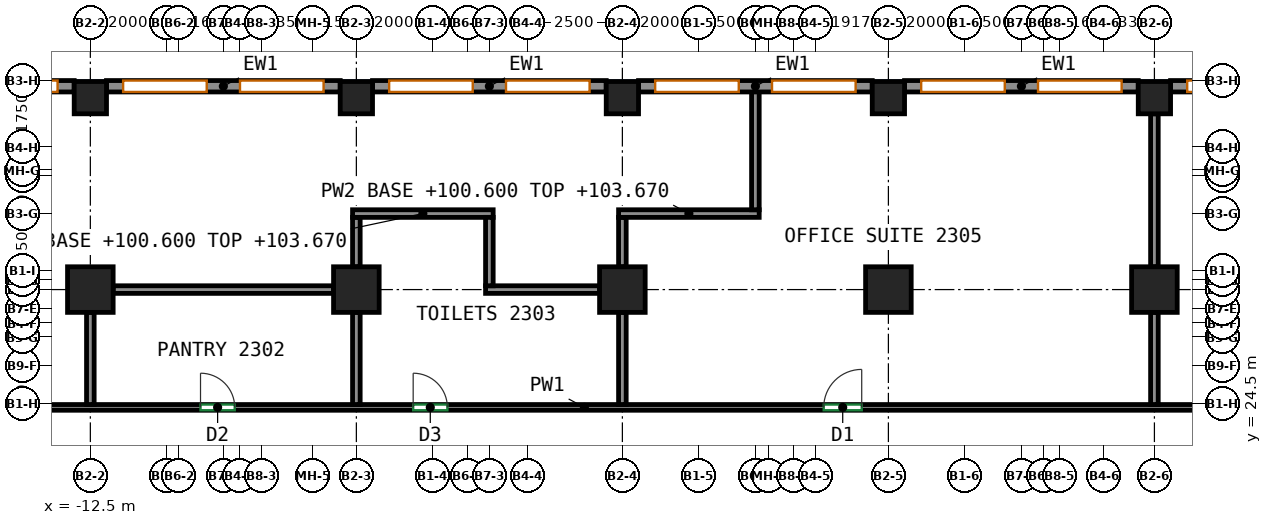
"""IFC4 building model, lengths in metres.
Left out: names, types, materials, properties, quantities, classifications, styles, units other than length and angle.
Written with IfcOpenShell. Run it as: python <this file> out.ifc"""

import sys

from ifc_helpers import new_model, si_unit, direction, frame, frame_2d, origin, origin_2d, place, context, subcontext, project, spatial, rectangle, extrude, source, transform, mapped, element, fill, save


model = new_model("IFC4")
c1 = context("Model", 3, precision=1e-05, world=origin(), true_north=direction((0.0, 1.0)))
c2 = subcontext(c1, "Body", "Model", "MODEL_VIEW")
j1 = project(units=[si_unit("LENGTHUNIT", "METRE"), si_unit("PLANEANGLEUNIT", "RADIAN")], contexts=[c1])
p1 = place(None, origin())
s1 = spatial("IfcSite", under=j1, at=p1, CompositionType="ELEMENT")
p2 = place(p1, origin())
s2 = spatial("IfcBuilding", under=s1, at=p2, CompositionType="ELEMENT")
p3 = place(p2, frame((0.0, 0.0, 100.6)))
s3 = spatial("IfcBuildingStorey", under=s2, at=p3, CompositionType="ELEMENT", Elevation=100.6)
m1 = source(origin(), c2, "Body", "SweptSolid", [
    extrude(rectangle(XDim=1.2, YDim=1.2, at=origin_2d()), origin(), (0.0, 0.0, 1.0), 3.72),
])
p4 = place(p3, frame((-12.5, 27.5, 0.0), z_axis=(0.0, 0.0, 1.0), x_axis=(1.0, 0.0, 0.0)))
e1 = element("IfcColumn", 1, at=p4, inside=s3, PredefinedType="COLUMN", context=c2, shape_type="MappedRepresentation", body=[
    mapped(m1, transform((0.0, 0.0, 0.0))),
])
m2 = source(origin(), c2, "Body", "SweptSolid", [
    extrude(rectangle(XDim=0.85, YDim=0.85, at=origin_2d()), origin(), (0.0, 0.0, 1.0), 3.72),
])
p5 = place(p3, frame((-12.5, 32.55, 0.0), z_axis=(0.0, 0.0, 1.0), x_axis=(1.0, 0.0, 0.0)))
e2 = element("IfcColumn", 2, at=p5, inside=s3, PredefinedType="COLUMN", context=c2, shape_type="MappedRepresentation", body=[
    mapped(m2, transform((0.0, 0.0, 0.0))),
])
p6 = place(p3, frame((-5.5, 27.5, 0.0), z_axis=(0.0, 0.0, 1.0), x_axis=(1.0, 0.0, 0.0)))
e3 = element("IfcColumn", 3, at=p6, inside=s3, PredefinedType="COLUMN", context=c2, shape_type="MappedRepresentation", body=[
    mapped(m1, transform((0.0, 0.0, 0.0))),
])
p7 = place(p3, frame((-5.5, 32.55, 0.0), z_axis=(0.0, 0.0, 1.0), x_axis=(1.0, 0.0, 0.0)))
e4 = element("IfcColumn", 4, at=p7, inside=s3, PredefinedType="COLUMN", context=c2, shape_type="MappedRepresentation", body=[
    mapped(m2, transform((0.0, 0.0, 0.0))),
])
p8 = place(p3, frame((1.5, 27.5, 0.0), z_axis=(0.0, 0.0, 1.0), x_axis=(1.0, 0.0, 0.0)))
e5 = element("IfcColumn", 5, at=p8, inside=s3, PredefinedType="COLUMN", context=c2, shape_type="MappedRepresentation", body=[
    mapped(m1, transform((0.0, 0.0, 0.0))),
])
p9 = place(p3, frame((1.5, 32.55, 0.0), z_axis=(0.0, 0.0, 1.0), x_axis=(1.0, 0.0, 0.0)))
e6 = element("IfcColumn", 6, at=p9, inside=s3, PredefinedType="COLUMN", context=c2, shape_type="MappedRepresentation", body=[
    mapped(m2, transform((0.0, 0.0, 0.0))),
])
p10 = place(p3, frame((8.5, 27.5, 0.0), z_axis=(0.0, 0.0, 1.0), x_axis=(1.0, 0.0, 0.0)))
e7 = element("IfcColumn", 7, at=p10, inside=s3, PredefinedType="COLUMN", context=c2, shape_type="MappedRepresentation", body=[
    mapped(m1, transform((0.0, 0.0, 0.0))),
])
p11 = place(p3, frame((8.5, 32.55, 0.0), z_axis=(0.0, 0.0, 1.0), x_axis=(1.0, 0.0, 0.0)))
e8 = element("IfcColumn", 8, at=p11, inside=s3, PredefinedType="COLUMN", context=c2, shape_type="MappedRepresentation", body=[
    mapped(m2, transform((0.0, 0.0, 0.0))),
])
p12 = place(p3, frame((15.5, 27.5, 0.0), z_axis=(0.0, 0.0, 1.0), x_axis=(1.0, 0.0, 0.0)))
e9 = element("IfcColumn", 9, at=p12, inside=s3, PredefinedType="COLUMN", context=c2, shape_type="MappedRepresentation", body=[
    mapped(m1, transform((0.0, 0.0, 0.0))),
])
p13 = place(p3, frame((15.5, 32.55, 0.0), z_axis=(0.0, 0.0, 1.0), x_axis=(1.0, 0.0, 0.0)))
e10 = element("IfcColumn", 10, at=p13, inside=s3, PredefinedType="COLUMN", context=c2, shape_type="MappedRepresentation", body=[
    mapped(m2, transform((0.0, 0.0, 0.0))),
])
m3 = source(origin(), c2, "Body", "SweptSolid", [
    extrude(rectangle(XDim=6.15, YDim=0.3, at=frame_2d((3.075, 0.0))), origin(), (0.0, 0.0, 1.0), 3.72),
])
p14 = place(p3, frame((22.075, 32.85, 0.0), z_axis=(0.0, 0.0, 1.0), x_axis=(-1.0, 0.0, 0.0)))
e11 = element("IfcWall", 11, at=p14, inside=s3, PredefinedType="SOLIDWALL", context=c2, shape_type="MappedRepresentation", body=[
    mapped(m3, transform((0.0, 0.0, 0.0))),
])
p15 = place(p14, frame((0.438, 0.0, 0.7)))
e12 = element("IfcOpeningElement", 12, at=p15, cuts=e11, PredefinedType="OPENING", context=c2, shape_type="SweptSolid", body=[
    extrude(rectangle(XDim=2.2, YDim=2.25, at=frame_2d((1.1, 1.125))), frame((0.0, 0.16, 0.0), z_axis=(0.0, -1.0, 0.0), x_axis=(1.0, 0.0, 0.0)), (0.0, 0.0, 1.0), 0.32),
])
p16 = place(p14, frame((3.512, 0.0, 0.7)))
e13 = element("IfcOpeningElement", 13, at=p16, cuts=e11, PredefinedType="OPENING", context=c2, shape_type="SweptSolid", body=[
    extrude(rectangle(XDim=2.2, YDim=2.25, at=frame_2d((1.1, 1.125))), frame((0.0, 0.16, 0.0), z_axis=(0.0, -1.0, 0.0), x_axis=(1.0, 0.0, 0.0)), (0.0, 0.0, 1.0), 0.32),
])
p17 = place(p3, frame((15.075, 32.85, 0.0), z_axis=(0.0, 0.0, 1.0), x_axis=(-1.0, 0.0, 0.0)))
e14 = element("IfcWall", 14, at=p17, inside=s3, PredefinedType="SOLIDWALL", context=c2, shape_type="MappedRepresentation", body=[
    mapped(m3, transform((0.0, 0.0, 0.0))),
])
p18 = place(p17, frame((0.438, 0.0, 0.7)))
e15 = element("IfcOpeningElement", 15, at=p18, cuts=e14, PredefinedType="OPENING", context=c2, shape_type="SweptSolid", body=[
    extrude(rectangle(XDim=2.2, YDim=2.25, at=frame_2d((1.1, 1.125))), frame((0.0, 0.16, 0.0), z_axis=(0.0, -1.0, 0.0), x_axis=(1.0, 0.0, 0.0)), (0.0, 0.0, 1.0), 0.32),
])
p19 = place(p17, frame((3.512, 0.0, 0.7)))
e16 = element("IfcOpeningElement", 16, at=p19, cuts=e14, PredefinedType="OPENING", context=c2, shape_type="SweptSolid", body=[
    extrude(rectangle(XDim=2.2, YDim=2.25, at=frame_2d((1.1, 1.125))), frame((0.0, 0.16, 0.0), z_axis=(0.0, -1.0, 0.0), x_axis=(1.0, 0.0, 0.0)), (0.0, 0.0, 1.0), 0.32),
])
p20 = place(p3, frame((8.075, 32.85, 0.0), z_axis=(0.0, 0.0, 1.0), x_axis=(-1.0, 0.0, 0.0)))
e17 = element("IfcWall", 17, at=p20, inside=s3, PredefinedType="SOLIDWALL", context=c2, shape_type="MappedRepresentation", body=[
    mapped(m3, transform((0.0, 0.0, 0.0))),
])
p21 = place(p20, frame((0.438, 0.0, 0.7)))
e18 = element("IfcOpeningElement", 18, at=p21, cuts=e17, PredefinedType="OPENING", context=c2, shape_type="SweptSolid", body=[
    extrude(rectangle(XDim=2.2, YDim=2.25, at=frame_2d((1.1, 1.125))), frame((0.0, 0.16, 0.0), z_axis=(0.0, -1.0, 0.0), x_axis=(1.0, 0.0, 0.0)), (0.0, 0.0, 1.0), 0.32),
])
p22 = place(p20, frame((3.512, 0.0, 0.7)))
e19 = element("IfcOpeningElement", 19, at=p22, cuts=e17, PredefinedType="OPENING", context=c2, shape_type="SweptSolid", body=[
    extrude(rectangle(XDim=2.2, YDim=2.25, at=frame_2d((1.1, 1.125))), frame((0.0, 0.16, 0.0), z_axis=(0.0, -1.0, 0.0), x_axis=(1.0, 0.0, 0.0)), (0.0, 0.0, 1.0), 0.32),
])
p23 = place(p3, frame((1.075, 32.85, 0.0), z_axis=(0.0, 0.0, 1.0), x_axis=(-1.0, 0.0, 0.0)))
e20 = element("IfcWall", 20, at=p23, inside=s3, PredefinedType="SOLIDWALL", context=c2, shape_type="MappedRepresentation", body=[
    mapped(m3, transform((0.0, 0.0, 0.0))),
])
p24 = place(p23, frame((0.438, 0.0, 0.7)))
e21 = element("IfcOpeningElement", 21, at=p24, cuts=e20, PredefinedType="OPENING", context=c2, shape_type="SweptSolid", body=[
    extrude(rectangle(XDim=2.2, YDim=2.25, at=frame_2d((1.1, 1.125))), frame((0.0, 0.16, 0.0), z_axis=(0.0, -1.0, 0.0), x_axis=(1.0, 0.0, 0.0)), (0.0, 0.0, 1.0), 0.32),
])
p25 = place(p23, frame((3.512, 0.0, 0.7)))
e22 = element("IfcOpeningElement", 22, at=p25, cuts=e20, PredefinedType="OPENING", context=c2, shape_type="SweptSolid", body=[
    extrude(rectangle(XDim=2.2, YDim=2.25, at=frame_2d((1.1, 1.125))), frame((0.0, 0.16, 0.0), z_axis=(0.0, -1.0, 0.0), x_axis=(1.0, 0.0, 0.0)), (0.0, 0.0, 1.0), 0.32),
])
p26 = place(p3, frame((-5.925, 32.85, 0.0), z_axis=(0.0, 0.0, 1.0), x_axis=(-1.0, 0.0, 0.0)))
e23 = element("IfcWall", 23, at=p26, inside=s3, PredefinedType="SOLIDWALL", context=c2, shape_type="MappedRepresentation", body=[
    mapped(m3, transform((0.0, 0.0, 0.0))),
])
p27 = place(p26, frame((0.438, 0.0, 0.7)))
e24 = element("IfcOpeningElement", 24, at=p27, cuts=e23, PredefinedType="OPENING", context=c2, shape_type="SweptSolid", body=[
    extrude(rectangle(XDim=2.2, YDim=2.25, at=frame_2d((1.1, 1.125))), frame((0.0, 0.16, 0.0), z_axis=(0.0, -1.0, 0.0), x_axis=(1.0, 0.0, 0.0)), (0.0, 0.0, 1.0), 0.32),
])
p28 = place(p26, frame((3.512, 0.0, 0.7)))
e25 = element("IfcOpeningElement", 25, at=p28, cuts=e23, PredefinedType="OPENING", context=c2, shape_type="SweptSolid", body=[
    extrude(rectangle(XDim=2.2, YDim=2.25, at=frame_2d((1.1, 1.125))), frame((0.0, 0.16, 0.0), z_axis=(0.0, -1.0, 0.0), x_axis=(1.0, 0.0, 0.0)), (0.0, 0.0, 1.0), 0.32),
])
p29 = place(p3, frame((-12.925, 32.85, 0.0), z_axis=(0.0, 0.0, 1.0), x_axis=(-1.0, 0.0, 0.0)))
e26 = element("IfcWall", 26, at=p29, inside=s3, PredefinedType="SOLIDWALL", context=c2, shape_type="MappedRepresentation", body=[
    mapped(m3, transform((0.0, 0.0, 0.0))),
])
p30 = place(p29, frame((0.438, 0.0, 0.7)))
e27 = element("IfcOpeningElement", 27, at=p30, cuts=e26, PredefinedType="OPENING", context=c2, shape_type="SweptSolid", body=[
    extrude(rectangle(XDim=2.2, YDim=2.25, at=frame_2d((1.1, 1.125))), frame((0.0, 0.16, 0.0), z_axis=(0.0, -1.0, 0.0), x_axis=(1.0, 0.0, 0.0)), (0.0, 0.0, 1.0), 0.32),
])
p31 = place(p29, frame((3.512, 0.0, 0.7)))
e28 = element("IfcOpeningElement", 28, at=p31, cuts=e26, PredefinedType="OPENING", context=c2, shape_type="SweptSolid", body=[
    extrude(rectangle(XDim=2.2, YDim=2.25, at=frame_2d((1.1, 1.125))), frame((0.0, 0.16, 0.0), z_axis=(0.0, -1.0, 0.0), x_axis=(1.0, 0.0, 0.0)), (0.0, 0.0, 1.0), 0.32),
])
p32 = place(p3, frame((-19.575, 24.4, 0.0), z_axis=(0.0, 0.0, 1.0), x_axis=(1.0, 0.0, 0.0)))
e29 = element("IfcWall", 29, at=p32, inside=s3, PredefinedType="PARTITIONING", context=c2, shape_type="SweptSolid", body=[
    extrude(rectangle(XDim=40.15, YDim=0.15, at=frame_2d((20.075, 0.0))), origin(), (0.0, 0.0, 1.0), 3.72),
])
p33 = place(p32, frame((9.974, 0.0, 0.0)))
e30 = element("IfcOpeningElement", 30, at=p33, cuts=e29, PredefinedType="OPENING", context=c2, shape_type="SweptSolid", body=[
    extrude(rectangle(XDim=0.9, YDim=2.1, at=frame_2d((0.45, 1.05))), frame((0.0, 0.085, 0.0), z_axis=(0.0, -1.0, 0.0), x_axis=(1.0, 0.0, 0.0)), (0.0, 0.0, 1.0), 0.17),
])
p34 = place(p32, frame((15.57, 0.0, 0.0)))
e31 = element("IfcOpeningElement", 31, at=p34, cuts=e29, PredefinedType="OPENING", context=c2, shape_type="SweptSolid", body=[
    extrude(rectangle(XDim=0.9, YDim=2.1, at=frame_2d((0.45, 1.05))), frame((0.0, 0.085, 0.0), z_axis=(0.0, -1.0, 0.0), x_axis=(1.0, 0.0, 0.0)), (0.0, 0.0, 1.0), 0.17),
])
p35 = place(p32, frame((26.373, 0.0, 0.0)))
e32 = element("IfcOpeningElement", 32, at=p35, cuts=e29, PredefinedType="OPENING", context=c2, shape_type="SweptSolid", body=[
    extrude(rectangle(XDim=1.0, YDim=2.1, at=frame_2d((0.5, 1.05))), frame((0.0, 0.085, 0.0), z_axis=(0.0, -1.0, 0.0), x_axis=(1.0, 0.0, 0.0)), (0.0, 0.0, 1.0), 0.17),
])
p36 = place(p32, frame((37.619, 0.0, 0.0)))
e33 = element("IfcOpeningElement", 33, at=p36, cuts=e29, PredefinedType="OPENING", context=c2, shape_type="SweptSolid", body=[
    extrude(rectangle(XDim=1.0, YDim=2.1, at=frame_2d((0.5, 1.05))), frame((0.0, 0.085, 0.0), z_axis=(0.0, -1.0, 0.0), x_axis=(1.0, 0.0, 0.0)), (0.0, 0.0, 1.0), 0.17),
])
p37 = place(p3, frame((15.5, 28.1, 0.0), z_axis=(0.0, 0.0, 1.0), x_axis=(0.0, 1.0, 0.0)))
e34 = element("IfcWall", 34, at=p37, inside=s3, PredefinedType="PARTITIONING", context=c2, shape_type="SweptSolid", body=[
    extrude(rectangle(XDim=4.025, YDim=0.2, at=frame_2d((2.012, 0.0))), origin(), (0.0, 0.0, 1.0), 3.72),
])
for number, where, z_axis, x_axis in (
    (35, (15.5, 24.476, 0.0), (0.0, 0.0, 1.0), (0.0, 1.0, 0.0)),
    (36, (1.5, 24.476, 0.0), (0.0, 0.0, 1.0), (0.0, 1.0, 0.0)),
):
    element("IfcWall", number, at=place(p3, frame(where, z_axis=z_axis, x_axis=x_axis)), inside=s3, PredefinedType="PARTITIONING", context=c2, shape_type="SweptSolid", body=[
        extrude(rectangle(XDim=2.424, YDim=0.2, at=frame_2d((1.212, 0.0))), origin(), (0.0, 0.0, 1.0), 3.72),
    ])
p38 = place(p3, frame((1.5, 28.1, 0.0), z_axis=(0.0, 0.0, 1.0), x_axis=(0.0, 1.0, 0.0)))
e37 = element("IfcWall", 37, at=p38, inside=s3, PredefinedType="PARTITIONING", context=c2, shape_type="SweptSolid", body=[
    extrude(rectangle(XDim=1.3, YDim=0.2, at=frame_2d((0.65, 0.0))), origin(), (0.0, 0.0, 1.0), 3.72),
])
p39 = place(p3, frame((1.4, 29.5, 0.0), z_axis=(0.0, 0.0, 1.0), x_axis=(1.0, 0.0, 0.0)))
e38 = element("IfcWall", 38, at=p39, inside=s3, PredefinedType="PARTITIONING", context=c2, shape_type="SweptSolid", body=[
    extrude(rectangle(XDim=3.7, YDim=0.2, at=frame_2d((1.85, 0.0))), origin(), (0.0, 0.0, 1.0), 3.07),
])
p40 = place(p3, frame((5.0, 29.6, 0.0), z_axis=(0.0, 0.0, 1.0), x_axis=(0.0, 1.0, 0.0)))
e39 = element("IfcWall", 39, at=p40, inside=s3, PredefinedType="PARTITIONING", context=c2, shape_type="SweptSolid", body=[
    extrude(rectangle(XDim=3.15, YDim=0.2, at=frame_2d((1.575, 0.0))), origin(), (0.0, 0.0, 1.0), 3.72),
])
p41 = place(p3, frame((-5.5, 24.476, 0.0), z_axis=(0.0, 0.0, 1.0), x_axis=(0.0, 1.0, 0.0)))
e40 = element("IfcWall", 40, at=p41, inside=s3, PredefinedType="PARTITIONING", context=c2, shape_type="SweptSolid", body=[
    extrude(rectangle(XDim=2.424, YDim=0.2, at=frame_2d((1.212, 0.0))), origin(), (0.0, 0.0, 1.0), 3.72),
])
p42 = place(p3, frame((-2.1, 27.5, 0.0), z_axis=(0.0, 0.0, 1.0), x_axis=(1.0, 0.0, 0.0)))
e41 = element("IfcWall", 41, at=p42, inside=s3, PredefinedType="PARTITIONING", context=c2, shape_type="SweptSolid", body=[
    extrude(rectangle(XDim=3.0, YDim=0.2, at=frame_2d((1.5, 0.0))), origin(), (0.0, 0.0, 1.0), 3.72),
])
p43 = place(p3, frame((-5.5, 28.1, 0.0), z_axis=(0.0, 0.0, 1.0), x_axis=(0.0, 1.0, 0.0)))
e42 = element("IfcWall", 42, at=p43, inside=s3, PredefinedType="PARTITIONING", context=c2, shape_type="SweptSolid", body=[
    extrude(rectangle(XDim=1.3, YDim=0.2, at=frame_2d((0.65, 0.0))), origin(), (0.0, 0.0, 1.0), 3.72),
])
p44 = place(p3, frame((-5.6, 29.5, 0.0), z_axis=(0.0, 0.0, 1.0), x_axis=(1.0, 0.0, 0.0)))
e43 = element("IfcWall", 43, at=p44, inside=s3, PredefinedType="PARTITIONING", context=c2, shape_type="SweptSolid", body=[
    extrude(rectangle(XDim=3.7, YDim=0.2, at=frame_2d((1.85, 0.0))), origin(), (0.0, 0.0, 1.0), 3.07),
])
p45 = place(p3, frame((-2.0, 27.6, 0.0), z_axis=(0.0, 0.0, 1.0), x_axis=(0.0, 1.0, 0.0)))
e44 = element("IfcWall", 44, at=p45, inside=s3, PredefinedType="PARTITIONING", context=c2, shape_type="SweptSolid", body=[
    extrude(rectangle(XDim=1.8, YDim=0.2, at=frame_2d((0.9, 0.0))), origin(), (0.0, 0.0, 1.0), 3.72),
])
p46 = place(p3, frame((-12.5, 26.9, 0.0), z_axis=(0.0, 0.0, 1.0), x_axis=(0.0, -1.0, 0.0)))
e45 = element("IfcWall", 45, at=p46, inside=s3, PredefinedType="PARTITIONING", context=c2, shape_type="SweptSolid", body=[
    extrude(rectangle(XDim=2.424, YDim=0.2, at=frame_2d((1.212, 0.0))), origin(), (0.0, 0.0, 1.0), 3.72),
])
p47 = place(p3, frame((-11.9, 27.5, 0.0), z_axis=(0.0, 0.0, 1.0), x_axis=(1.0, 0.0, 0.0)))
e46 = element("IfcWall", 46, at=p47, inside=s3, PredefinedType="PARTITIONING", context=c2, shape_type="SweptSolid", body=[
    extrude(rectangle(XDim=5.8, YDim=0.2, at=frame_2d((2.9, 0.0))), origin(), (0.0, 0.0, 1.0), 3.72),
])
p48 = place(p16, origin())
e47 = element("IfcWindow", 47, at=p48, inside=s3, PartitioningType="SINGLE_PANEL", PredefinedType="WINDOW", context=c2, shape_type="SweptSolid", body=[
    extrude(rectangle(XDim=2.2, YDim=2.25, at=frame_2d((1.1, 1.125))), frame((0.0, 0.03, 0.0), z_axis=(0.0, -1.0, 0.0), x_axis=(1.0, 0.0, 0.0)), (0.0, 0.0, 1.0), 0.06),
])
fill(e13, e47)
p49 = place(p18, origin())
e48 = element("IfcWindow", 48, at=p49, inside=s3, PartitioningType="SINGLE_PANEL", PredefinedType="WINDOW", context=c2, shape_type="SweptSolid", body=[
    extrude(rectangle(XDim=2.2, YDim=2.25, at=frame_2d((1.1, 1.125))), frame((0.0, 0.03, 0.0), z_axis=(0.0, -1.0, 0.0), x_axis=(1.0, 0.0, 0.0)), (0.0, 0.0, 1.0), 0.06),
])
fill(e15, e48)
p50 = place(p19, origin())
e49 = element("IfcWindow", 49, at=p50, inside=s3, PartitioningType="SINGLE_PANEL", PredefinedType="WINDOW", context=c2, shape_type="SweptSolid", body=[
    extrude(rectangle(XDim=2.2, YDim=2.25, at=frame_2d((1.1, 1.125))), frame((0.0, 0.03, 0.0), z_axis=(0.0, -1.0, 0.0), x_axis=(1.0, 0.0, 0.0)), (0.0, 0.0, 1.0), 0.06),
])
fill(e16, e49)
p51 = place(p21, origin())
e50 = element("IfcWindow", 50, at=p51, inside=s3, PartitioningType="SINGLE_PANEL", PredefinedType="WINDOW", context=c2, shape_type="SweptSolid", body=[
    extrude(rectangle(XDim=2.2, YDim=2.25, at=frame_2d((1.1, 1.125))), frame((0.0, 0.03, 0.0), z_axis=(0.0, -1.0, 0.0), x_axis=(1.0, 0.0, 0.0)), (0.0, 0.0, 1.0), 0.06),
])
fill(e18, e50)
p52 = place(p22, origin())
e51 = element("IfcWindow", 51, at=p52, inside=s3, PartitioningType="SINGLE_PANEL", PredefinedType="WINDOW", context=c2, shape_type="SweptSolid", body=[
    extrude(rectangle(XDim=2.2, YDim=2.25, at=frame_2d((1.1, 1.125))), frame((0.0, 0.03, 0.0), z_axis=(0.0, -1.0, 0.0), x_axis=(1.0, 0.0, 0.0)), (0.0, 0.0, 1.0), 0.06),
])
fill(e19, e51)
p53 = place(p24, origin())
e52 = element("IfcWindow", 52, at=p53, inside=s3, PartitioningType="SINGLE_PANEL", PredefinedType="WINDOW", context=c2, shape_type="SweptSolid", body=[
    extrude(rectangle(XDim=2.2, YDim=2.25, at=frame_2d((1.1, 1.125))), frame((0.0, 0.03, 0.0), z_axis=(0.0, -1.0, 0.0), x_axis=(1.0, 0.0, 0.0)), (0.0, 0.0, 1.0), 0.06),
])
fill(e21, e52)
p54 = place(p25, origin())
e53 = element("IfcWindow", 53, at=p54, inside=s3, PartitioningType="SINGLE_PANEL", PredefinedType="WINDOW", context=c2, shape_type="SweptSolid", body=[
    extrude(rectangle(XDim=2.2, YDim=2.25, at=frame_2d((1.1, 1.125))), frame((0.0, 0.03, 0.0), z_axis=(0.0, -1.0, 0.0), x_axis=(1.0, 0.0, 0.0)), (0.0, 0.0, 1.0), 0.06),
])
fill(e22, e53)
p55 = place(p27, origin())
e54 = element("IfcWindow", 54, at=p55, inside=s3, PartitioningType="SINGLE_PANEL", PredefinedType="WINDOW", context=c2, shape_type="SweptSolid", body=[
    extrude(rectangle(XDim=2.2, YDim=2.25, at=frame_2d((1.1, 1.125))), frame((0.0, 0.03, 0.0), z_axis=(0.0, -1.0, 0.0), x_axis=(1.0, 0.0, 0.0)), (0.0, 0.0, 1.0), 0.06),
])
fill(e24, e54)
p56 = place(p28, origin())
e55 = element("IfcWindow", 55, at=p56, inside=s3, PartitioningType="SINGLE_PANEL", PredefinedType="WINDOW", context=c2, shape_type="SweptSolid", body=[
    extrude(rectangle(XDim=2.2, YDim=2.25, at=frame_2d((1.1, 1.125))), frame((0.0, 0.03, 0.0), z_axis=(0.0, -1.0, 0.0), x_axis=(1.0, 0.0, 0.0)), (0.0, 0.0, 1.0), 0.06),
])
fill(e25, e55)
p57 = place(p30, origin())
e56 = element("IfcWindow", 56, at=p57, inside=s3, PartitioningType="SINGLE_PANEL", PredefinedType="WINDOW", context=c2, shape_type="SweptSolid", body=[
    extrude(rectangle(XDim=2.2, YDim=2.25, at=frame_2d((1.1, 1.125))), frame((0.0, 0.03, 0.0), z_axis=(0.0, -1.0, 0.0), x_axis=(1.0, 0.0, 0.0)), (0.0, 0.0, 1.0), 0.06),
])
fill(e27, e56)
p58 = place(p33, origin())
e57 = element("IfcDoor", 57, at=p58, inside=s3, OperationType="SINGLE_SWING_LEFT", PredefinedType="DOOR", context=c2, shape_type="SweptSolid", body=[
    extrude(rectangle(XDim=0.9, YDim=2.1, at=frame_2d((0.45, 1.05))), frame((0.0, 0.025, 0.0), z_axis=(0.0, -1.0, 0.0), x_axis=(1.0, 0.0, 0.0)), (0.0, 0.0, 1.0), 0.05),
])
fill(e30, e57)
p59 = place(p34, origin())
e58 = element("IfcDoor", 58, at=p59, inside=s3, OperationType="SINGLE_SWING_LEFT", PredefinedType="DOOR", context=c2, shape_type="SweptSolid", body=[
    extrude(rectangle(XDim=0.9, YDim=2.1, at=frame_2d((0.45, 1.05))), frame((0.0, 0.025, 0.0), z_axis=(0.0, -1.0, 0.0), x_axis=(1.0, 0.0, 0.0)), (0.0, 0.0, 1.0), 0.05),
])
fill(e31, e58)
p60 = place(p35, origin())
e59 = element("IfcDoor", 59, at=p60, inside=s3, OperationType="SINGLE_SWING_RIGHT", PredefinedType="DOOR", context=c2, shape_type="SweptSolid", body=[
    extrude(rectangle(XDim=1.0, YDim=2.1, at=frame_2d((0.5, 1.05))), frame((0.0, 0.025, 0.0), z_axis=(0.0, -1.0, 0.0), x_axis=(1.0, 0.0, 0.0)), (0.0, 0.0, 1.0), 0.05),
])
fill(e32, e59)
save(model, sys.argv[1])
